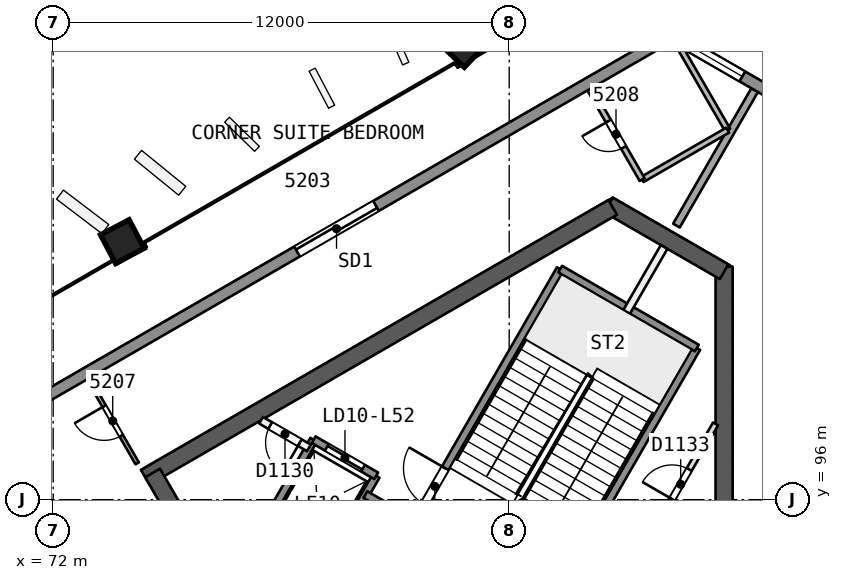
"""IFC4 building model, lengths in metres.
Left out: names, types, materials, properties, quantities, classifications, styles, units other than length and angle.
Written with IfcOpenShell. Run it as: python <this file> out.ifc"""

import sys

from ifc_helpers import new_model, si_unit, direction, frame, frame_2d, origin, origin_2d, place, context, subcontext, project, spatial, rectangle, extrude, element, fill, save


model = new_model("IFC4")
c1 = context("Model", 3, precision=1e-05, world=origin(), true_north=direction((0.0, 1.0)))
c2 = subcontext(c1, "Body", "Model", "MODEL_VIEW")
j1 = project(units=[si_unit("LENGTHUNIT", "METRE"), si_unit("PLANEANGLEUNIT", "RADIAN")], contexts=[c1])
p1 = place(None, origin())
s1 = spatial("IfcSite", under=j1, at=p1, CompositionType="ELEMENT")
p2 = place(p1, origin())
s2 = spatial("IfcBuilding", under=s1, at=p2, CompositionType="ELEMENT")
p3 = place(p2, frame((0.0, 0.0, 213.2)))
s3 = spatial("IfcBuildingStorey", under=s2, at=p3, CompositionType="ELEMENT", Elevation=213.2)
p4 = place(p3, frame((89.655, 88.019, 0.0), z_axis=(0.0, 0.0, 1.0), x_axis=(0.0, 1.0, 0.0)))
e1 = element("IfcWall", 1, at=p4, inside=s3, PredefinedType="SHEAR", context=c2, shape_type="SweptSolid", body=[
    extrude(rectangle(XDim=14.108, YDim=0.45, at=frame_2d((7.054, 0.0))), origin(), (0.0, 0.0, 1.0), 3.7),
])
p5 = place(p3, frame((89.655, 101.998, 0.0), z_axis=(0.0, 0.0, 1.0), x_axis=(-0.866042179588, 0.49997094233, 0.0)))
e2 = element("IfcWall", 2, at=p5, inside=s3, PredefinedType="SHEAR", context=c2, shape_type="SweptSolid", body=[
    extrude(rectangle(XDim=3.515, YDim=0.45, at=frame_2d((1.758, 0.0))), origin(), (0.0, 0.0, 1.0), 3.7),
])
p6 = place(p3, frame((86.723, 103.69, 0.0), z_axis=(0.0, 0.0, 1.0), x_axis=(-0.866022713978, -0.500004658852, 0.0)))
e3 = element("IfcWall", 3, at=p6, inside=s3, PredefinedType="SHEAR", context=c2, shape_type="SweptSolid", body=[
    extrude(rectangle(XDim=14.203, YDim=0.45, at=frame_2d((7.102, 0.0))), origin(), (0.0, 0.0, 1.0), 3.7),
])
p7 = place(p3, frame((74.617, 96.701, 0.0), z_axis=(0.0, 0.0, 1.0), x_axis=(0.499994385119, -0.866028645513, 0.0)))
e4 = element("IfcWall", 4, at=p7, inside=s3, PredefinedType="SHEAR", context=c2, shape_type="SweptSolid", body=[
    extrude(rectangle(XDim=10.155, YDim=0.45, at=frame_2d((5.077, 0.0))), origin(), (0.0, 0.0, 1.0), 3.7),
])
p8 = place(p7, frame((8.005, 0.0, 0.0)))
e5 = element("IfcOpeningElement", 5, at=p8, cuts=e4, PredefinedType="OPENING", context=c2, shape_type="SweptSolid", body=[
    extrude(rectangle(XDim=1.2, YDim=2.1, at=frame_2d((0.6, 1.05))), frame((0.0, 0.235, 0.0), z_axis=(0.0, -1.0, 0.0), x_axis=(1.0, 0.0, 0.0)), (0.0, 0.0, 1.0), 0.471),
])
p9 = place(p3, frame((91.809, 109.114, 0.0), z_axis=(-0.017607001884, -0.030531992032, 0.999378702468), x_axis=(0.866280455458, -0.499557977108, 1.01498e-07)))
e6 = element("IfcColumn", 6, at=p9, inside=s3, PredefinedType="COLUMN", context=c2, shape_type="SweptSolid", body=[
    extrude(rectangle(XDim=1.9, YDim=1.9, at=origin_2d()), origin(), (0.0, 0.0, 1.0), 3.702),
])
p10 = place(p3, frame((82.814, 108.011, 0.0), z_axis=(-0.00837646992, -0.028097450282, 0.999570091609), x_axis=(0.866168540849, 0.499298149106, 0.021293593943)))
e7 = element("IfcColumn", 7, at=p10, inside=s3, PredefinedType="COLUMN", context=c2, shape_type="SweptSolid", body=[
    extrude(rectangle(XDim=0.85, YDim=0.85, at=origin_2d()), origin(), (0.0, 0.0, 1.0), 3.702),
])
p11 = place(p3, frame((73.819, 102.818, 0.0), z_axis=(0.000857580205, -0.022758859284, 0.9997406158), x_axis=(0.86599968756, 0.499931370183, 0.010637962836)))
e8 = element("IfcColumn", 8, at=p11, inside=s3, PredefinedType="COLUMN", context=c2, shape_type="SweptSolid", body=[
    extrude(rectangle(XDim=0.85, YDim=0.85, at=origin_2d()), origin(), (0.0, 0.0, 1.0), 3.701),
])
p12 = place(p3, frame((90.459, 106.776, 0.0), z_axis=(0.0, 0.0, 1.0), x_axis=(-0.499979154163, -0.8660374388, 0.0)))
e9 = element("IfcWall", 9, at=p12, inside=s3, PredefinedType="PARTITIONING", context=c2, shape_type="SweptSolid", body=[
    extrude(rectangle(XDim=4.116, YDim=0.2, at=frame_2d((2.058, 0.0))), origin(), (0.0, 0.0, 1.0), 3.3),
])
p13 = place(p3, frame((74.21, 96.956, 0.0), z_axis=(0.0, 0.0, 1.0), x_axis=(-0.49995513091, 0.866051307416, 0.0)))
e10 = element("IfcWall", 10, at=p13, inside=s3, PredefinedType="PARTITIONING", context=c2, shape_type="SweptSolid", body=[
    extrude(rectangle(XDim=2.573, YDim=0.1, at=frame_2d((1.287, 0.0))), origin(), (0.0, 0.0, 1.0), 3.3),
])
p14 = place(p13, frame((0.837, 0.0, 0.0)))
e11 = element("IfcOpeningElement", 11, at=p14, cuts=e10, PredefinedType="OPENING", context=c2, shape_type="SweptSolid", body=[
    extrude(rectangle(XDim=0.9, YDim=2.1, at=frame_2d((0.45, 1.05))), frame((0.0, 0.061, 0.0), z_axis=(0.0, -1.0, 0.0), x_axis=(1.0, 0.0, 0.0)), (0.0, 0.0, 1.0), 0.121),
])
p15 = place(p3, frame((67.794, 96.223, 0.0), z_axis=(0.0, 0.0, 1.0), x_axis=(0.500010840071, -0.866019145176, 0.0)))
e12 = element("IfcWall", 12, at=p15, inside=s3, PredefinedType="PARTITIONING", context=c2, shape_type="SweptSolid", body=[
    extrude(rectangle(XDim=10.552, YDim=0.2, at=frame_2d((5.276, 0.0))), origin(), (0.0, 0.0, 1.0), 3.3),
])
p16 = place(p3, frame((88.483, 107.917, 0.0), z_axis=(0.0, 0.0, 1.0), x_axis=(0.499983796486, -0.866034758685, 0.0)))
e13 = element("IfcWall", 13, at=p16, inside=s3, PredefinedType="PARTITIONING", context=c2, shape_type="SweptSolid", body=[
    extrude(rectangle(XDim=2.534, YDim=0.15, at=frame_2d((1.267, 0.0))), origin(), (0.0, 0.0, 1.0), 3.3),
])
p17 = place(p3, frame((89.75, 105.723, 0.0), z_axis=(0.0, 0.0, 1.0), x_axis=(-0.866021400173, -0.500006934395, 0.0)))
e14 = element("IfcWall", 14, at=p17, inside=s3, PredefinedType="PARTITIONING", context=c2, shape_type="SweptSolid", body=[
    extrude(rectangle(XDim=2.6, YDim=0.15, at=frame_2d((1.3, 0.0))), origin(), (0.0, 0.0, 1.0), 3.3),
])
p18 = place(p3, frame((87.498, 104.423, 0.0), z_axis=(0.0, 0.0, 1.0), x_axis=(-0.499947816978, 0.86605552957, 0.0)))
e15 = element("IfcWall", 15, at=p18, inside=s3, PredefinedType="PARTITIONING", context=c2, shape_type="SweptSolid", body=[
    extrude(rectangle(XDim=2.751, YDim=0.15, at=frame_2d((1.375, 0.0))), origin(), (0.0, 0.0, 1.0), 3.3),
])
p19 = place(p18, frame((0.975, 0.0, 0.0)))
e16 = element("IfcOpeningElement", 16, at=p19, cuts=e15, PredefinedType="OPENING", context=c2, shape_type="SweptSolid", body=[
    extrude(rectangle(XDim=0.8, YDim=2.1, at=frame_2d((0.4, 1.05))), frame((0.0, 0.085, 0.0), z_axis=(0.0, -1.0, 0.0), x_axis=(1.0, 0.0, 0.0)), (0.0, 0.0, 1.0), 0.171),
])
p20 = place(p3, frame((88.266, 108.214, 0.0), z_axis=(0.0, 0.0, 1.0), x_axis=(0.866014017669, -0.500019720812, 0.0)))
e17 = element("IfcWall", 17, at=p20, inside=s3, PredefinedType="SOLIDWALL", context=c2, shape_type="SweptSolid", body=[
    extrude(rectangle(XDim=5.237, YDim=0.3, at=frame_2d((2.619, 0.0))), origin(), (0.0, 0.0, 1.0), 3.3),
])
p21 = place(p20, frame((3.071, 0.0, 0.9)))
e18 = element("IfcOpeningElement", 18, at=p21, cuts=e17, PredefinedType="OPENING", context=c2, shape_type="SweptSolid", body=[
    extrude(rectangle(XDim=1.8, YDim=1.5, at=frame_2d((0.9, 0.75))), frame((0.0, 0.161, 0.0), z_axis=(0.0, -1.0, 0.0), x_axis=(1.0, 0.0, 0.0)), (0.0, 0.0, 1.0), 0.321),
])
p22 = place(p20, frame((0.358, 0.0, 0.9)))
e19 = element("IfcOpeningElement", 19, at=p22, cuts=e17, PredefinedType="OPENING", context=c2, shape_type="SweptSolid", body=[
    extrude(rectangle(XDim=1.8, YDim=1.5, at=frame_2d((0.9, 0.75))), frame((0.0, 0.161, 0.0), z_axis=(0.0, -1.0, 0.0), x_axis=(1.0, 0.0, 0.0)), (0.0, 0.0, 1.0), 0.321),
])
p23 = place(p3, frame((43.933, 82.619, 0.0), z_axis=(0.0, 0.0, 1.0), x_axis=(0.866026349667, 0.49999836168, 0.0)))
e20 = element("IfcWall", 20, at=p23, inside=s3, PredefinedType="SOLIDWALL", context=c2, shape_type="SweptSolid", body=[
    extrude(rectangle(XDim=51.192, YDim=0.3, at=frame_2d((25.596, 0.0))), origin(), (0.0, 0.0, 1.0), 3.3),
])
p24 = place(p23, frame((24.552, 0.0, 0.0)))
e21 = element("IfcOpeningElement", 21, at=p24, cuts=e20, PredefinedType="OPENING", context=c2, shape_type="SweptSolid", body=[
    extrude(rectangle(XDim=2.4, YDim=2.4, at=frame_2d((1.2, 1.2))), frame((0.0, 0.161, 0.0), z_axis=(0.0, -1.0, 0.0), x_axis=(1.0, 0.0, 0.0)), (0.0, 0.0, 1.0), 0.321),
])
p25 = place(p23, frame((29.228, 0.0, 0.0)))
e22 = element("IfcOpeningElement", 22, at=p25, cuts=e20, PredefinedType="OPENING", context=c2, shape_type="SweptSolid", body=[
    extrude(rectangle(XDim=2.4, YDim=2.4, at=frame_2d((1.2, 1.2))), frame((0.0, 0.161, 0.0), z_axis=(0.0, -1.0, 0.0), x_axis=(1.0, 0.0, 0.0)), (0.0, 0.0, 1.0), 0.321),
])
p26 = place(p23, frame((39.819, 0.0, 0.0)))
e23 = element("IfcOpeningElement", 23, at=p26, cuts=e20, PredefinedType="OPENING", context=c2, shape_type="SweptSolid", body=[
    extrude(rectangle(XDim=2.4, YDim=2.4, at=frame_2d((1.2, 1.2))), frame((0.0, 0.161, 0.0), z_axis=(0.0, -1.0, 0.0), x_axis=(1.0, 0.0, 0.0)), (0.0, 0.0, 1.0), 0.321),
])
p27 = place(p23, frame((19.719, 0.0, 0.0)))
e24 = element("IfcOpeningElement", 24, at=p27, cuts=e20, PredefinedType="OPENING", context=c2, shape_type="SweptSolid", body=[
    extrude(rectangle(XDim=2.4, YDim=2.4, at=frame_2d((1.2, 1.2))), frame((0.0, 0.161, 0.0), z_axis=(0.0, -1.0, 0.0), x_axis=(1.0, 0.0, 0.0)), (0.0, 0.0, 1.0), 0.321),
])
p28 = place(p23, frame((8.993, 0.0, 0.0)))
e25 = element("IfcOpeningElement", 25, at=p28, cuts=e20, PredefinedType="OPENING", context=c2, shape_type="SweptSolid", body=[
    extrude(rectangle(XDim=2.4, YDim=2.4, at=frame_2d((1.2, 1.2))), frame((0.0, 0.161, 0.0), z_axis=(0.0, -1.0, 0.0), x_axis=(1.0, 0.0, 0.0)), (0.0, 0.0, 1.0), 0.321),
])
p29 = place(p3, frame((87.621, 94.86, 0.0), z_axis=(0.0, 0.0, 1.0), x_axis=(0.499993116331, 0.866029378036, 0.0)))
e26 = element("IfcWall", 26, at=p29, inside=s3, PredefinedType="PARTITIONING", context=c2, shape_type="SweptSolid", body=[
    extrude(rectangle(XDim=3.618, YDim=0.15, at=frame_2d((1.809, 0.0))), origin(), (0.0, 0.0, 1.0), 3.3),
])
p30 = place(p29, frame((1.332, 0.0, 0.0)))
e27 = element("IfcOpeningElement", 27, at=p30, cuts=e26, PredefinedType="OPENING", context=c2, shape_type="SweptSolid", body=[
    extrude(rectangle(XDim=0.9, YDim=2.1, at=frame_2d((0.45, 1.05))), frame((0.0, 0.085, 0.0), z_axis=(0.0, -1.0, 0.0), x_axis=(1.0, 0.0, 0.0)), (0.0, 0.0, 1.0), 0.171),
])
p31 = place(p3, frame((85.087, 93.321, 0.0), z_axis=(0.0, 0.0, 1.0), x_axis=(0.500019787375, 0.866013979237, 0.0)))
e28 = element("IfcWall", 28, at=p31, inside=s3, PredefinedType="SOLIDWALL", context=c2, shape_type="SweptSolid", body=[
    extrude(rectangle(XDim=7.7, YDim=0.2, at=frame_2d((3.85, 0.0))), origin(), (0.0, 0.0, 1.0), 3.3),
])
p32 = place(p3, frame((87.09, 100.94, 0.0), z_axis=(0.0, 0.0, 1.0), x_axis=(0.500011643316, 0.866018681408, 0.0)))
e29 = element("IfcWall", 29, at=p32, inside=s3, PredefinedType="PARTITIONING", context=c2, shape_type="SweptSolid", body=[
    extrude(rectangle(XDim=1.973, YDim=0.2, at=frame_2d((0.987, 0.0))), origin(), (0.0, 0.0, 1.0), 3.3),
])
p33 = place(p3, frame((81.493, 95.396, 0.0), z_axis=(0.0, 0.0, 1.0), x_axis=(0.500006057782, 0.866021906294, 0.0)))
e30 = element("IfcWall", 30, at=p33, inside=s3, PredefinedType="SOLIDWALL", context=c2, shape_type="SweptSolid", body=[
    extrude(rectangle(XDim=7.7, YDim=0.2, at=frame_2d((3.85, 0.0))), origin(), (0.0, 0.0, 1.0), 3.3),
])
p34 = place(p33, frame((0.55, 0.0, 0.0)))
e31 = element("IfcOpeningElement", 31, at=p34, cuts=e30, PredefinedType="OPENING", context=c2, shape_type="SweptSolid", body=[
    extrude(rectangle(XDim=1.1, YDim=2.1, at=frame_2d((0.55, 1.05))), frame((0.0, 0.11, 0.0), z_axis=(0.0, -1.0, 0.0), x_axis=(1.0, 0.0, 0.0)), (0.0, 0.0, 1.0), 0.221),
])
for number, where, z_axis, x_axis in (
    (32, (78.976, 93.986, 0.0), (0.0, 0.0, 1.0), (0.5, 0.866, 0.0)),
    (33, (77.33, 94.936, 0.0), (0.0, 0.0, 1.0), (0.5, 0.866, 0.0)),
):
    element("IfcWall", number, at=place(p3, frame(where, z_axis=z_axis, x_axis=x_axis)), inside=s3, PredefinedType="SOLIDWALL", context=c2, shape_type="SweptSolid", body=[
        extrude(rectangle(XDim=3.05, YDim=0.2, at=frame_2d((1.525, 0.0))), origin(), (0.0, 0.0, 1.0), 3.3),
    ])
p35 = place(p3, frame((89.43, 90.814, 0.0), z_axis=(0.0, 0.0, 1.0), x_axis=(-0.866018983788, 0.500011119594, 0.0)))
e34 = element("IfcWall", 34, at=p35, inside=s3, PredefinedType="SOLIDWALL", context=c2, shape_type="SweptSolid", body=[
    extrude(rectangle(XDim=10.64, YDim=0.2, at=frame_2d((5.32, 0.0))), origin(), (0.0, 0.0, 1.0), 3.3),
])
p36 = place(p35, frame((0.37, 0.0, 0.0)))
e35 = element("IfcOpeningElement", 35, at=p36, cuts=e34, PredefinedType="OPENING", context=c2, shape_type="SweptSolid", body=[
    extrude(rectangle(XDim=0.9, YDim=2.1, at=frame_2d((0.45, 1.05))), frame((0.0, 0.11, 0.0), z_axis=(0.0, -1.0, 0.0), x_axis=(1.0, 0.0, 0.0)), (0.0, 0.0, 1.0), 0.221),
])
p37 = place(p3, frame((78.73, 97.361, 0.0), z_axis=(0.0, 0.0, 1.0), x_axis=(-0.866045896294, 0.499964504253, 0.0)))
e36 = element("IfcWall", 36, at=p37, inside=s3, PredefinedType="PARTITIONING", context=c2, shape_type="SweptSolid", body=[
    extrude(rectangle(XDim=1.455, YDim=0.2, at=frame_2d((0.728, 0.0))), origin(), (0.0, 0.0, 1.0), 3.3),
])
p38 = place(p37, frame((0.278, 0.0, 0.0)))
e37 = element("IfcOpeningElement", 37, at=p38, cuts=e36, PredefinedType="OPENING", context=c2, shape_type="SweptSolid", body=[
    extrude(rectangle(XDim=0.9, YDim=2.1, at=frame_2d((0.45, 1.05))), frame((0.0, 0.11, 0.0), z_axis=(0.0, -1.0, 0.0), x_axis=(1.0, 0.0, 0.0)), (0.0, 0.0, 1.0), 0.221),
])
p39 = place(p3, frame((80.5, 96.627, 0.0), z_axis=(0.0, 0.0, 1.0), x_axis=(-0.86601224135, 0.500022797313, 0.0)))
e38 = element("IfcWall", 38, at=p39, inside=s3, PredefinedType="SOLIDWALL", context=c2, shape_type="SweptSolid", body=[
    extrude(rectangle(XDim=1.9, YDim=0.2, at=frame_2d((0.95, 0.0))), origin(), (0.0, 0.0, 1.0), 3.3),
])
p40 = place(p39, frame((0.4, 0.0, 0.0)))
e39 = element("IfcOpeningElement", 39, at=p40, cuts=e38, PredefinedType="OPENING", context=c2, shape_type="SweptSolid", body=[
    extrude(rectangle(XDim=1.1, YDim=2.1, at=frame_2d((0.55, 1.05))), frame((0.0, 0.11, 0.0), z_axis=(0.0, -1.0, 0.0), x_axis=(1.0, 0.0, 0.0)), (0.0, 0.0, 1.0), 0.221),
])
p41 = place(p3, frame((88.937, 99.99, 0.0), z_axis=(0.0, 0.0, 1.0), x_axis=(-0.866004344652, 0.500036473714, 0.0)))
e40 = element("IfcWall", 40, at=p41, inside=s3, PredefinedType="SOLIDWALL", context=c2, shape_type="SweptSolid", body=[
    extrude(rectangle(XDim=4.15, YDim=0.2, at=frame_2d((2.075, 0.0))), origin(), (0.0, 0.0, 1.0), 3.3),
])
p42 = place(p14, origin())
e41 = element("IfcDoor", 41, at=p42, inside=s3, OperationType="SINGLE_SWING_RIGHT", PredefinedType="NOTDEFINED", context=c2, shape_type="SweptSolid", body=[
    extrude(rectangle(XDim=0.9, YDim=2.1, at=frame_2d((0.45, 1.05))), frame((0.0, 0.025, 0.0), z_axis=(0.0, -1.0, 0.0), x_axis=(1.0, 0.0, 0.0)), (0.0, 0.0, 1.0), 0.05),
])
fill(e11, e41)
p43 = place(p19, origin())
e42 = element("IfcDoor", 42, at=p43, inside=s3, OperationType="SINGLE_SWING_RIGHT", PredefinedType="NOTDEFINED", context=c2, shape_type="SweptSolid", body=[
    extrude(rectangle(XDim=0.8, YDim=2.1, at=frame_2d((0.4, 1.05))), frame((0.0, 0.025, 0.0), z_axis=(0.0, -1.0, 0.0), x_axis=(1.0, 0.0, 0.0)), (0.0, 0.0, 1.0), 0.05),
])
fill(e16, e42)
p44 = place(p22, origin())
e43 = element("IfcWindow", 43, at=p44, inside=s3, PartitioningType="SINGLE_PANEL", PredefinedType="WINDOW", context=c2, shape_type="SweptSolid", body=[
    extrude(rectangle(XDim=1.8, YDim=1.5, at=frame_2d((0.9, 0.75))), frame((0.0, 0.03, 0.0), z_axis=(0.0, -1.0, 0.0), x_axis=(1.0, 0.0, 0.0)), (0.0, 0.0, 1.0), 0.06),
])
fill(e19, e43)
p45 = place(p26, origin())
e44 = element("IfcDoor", 44, at=p45, inside=s3, OperationType="SLIDING_TO_LEFT", PredefinedType="NOTDEFINED", context=c2, shape_type="SweptSolid", body=[
    extrude(rectangle(XDim=2.4, YDim=2.4, at=frame_2d((1.2, 1.2))), frame((0.0, 0.025, 0.0), z_axis=(0.0, -1.0, 0.0), x_axis=(1.0, 0.0, 0.0)), (0.0, 0.0, 1.0), 0.05),
])
fill(e23, e44)
p46 = place(p40, origin())
e45 = element("IfcDoor", 45, at=p46, inside=s3, OperationType="SLIDING_TO_RIGHT", PredefinedType="NOTDEFINED", context=c2, shape_type="SweptSolid", body=[
    extrude(rectangle(XDim=1.1, YDim=2.1, at=frame_2d((0.55, 1.05))), frame((0.0, 0.025, 0.0), z_axis=(0.0, -1.0, 0.0), x_axis=(1.0, 0.0, 0.0)), (0.0, 0.0, 1.0), 0.05),
])
fill(e39, e45)
p47 = place(p38, origin())
e46 = element("IfcDoor", 46, at=p47, inside=s3, OperationType="SINGLE_SWING_LEFT", PredefinedType="NOTDEFINED", context=c2, shape_type="SweptSolid", body=[
    extrude(rectangle(XDim=0.9, YDim=2.1, at=frame_2d((0.45, 1.05))), frame((0.0, 0.025, 0.0), z_axis=(0.0, -1.0, 0.0), x_axis=(1.0, 0.0, 0.0)), (0.0, 0.0, 1.0), 0.05),
])
fill(e37, e46)
p48 = place(p34, origin())
e47 = element("IfcDoor", 47, at=p48, inside=s3, OperationType="SINGLE_SWING_RIGHT", PredefinedType="NOTDEFINED", context=c2, shape_type="SweptSolid", body=[
    extrude(rectangle(XDim=1.1, YDim=2.1, at=frame_2d((0.55, 1.05))), frame((0.0, 0.025, 0.0), z_axis=(0.0, -1.0, 0.0), x_axis=(1.0, 0.0, 0.0)), (0.0, 0.0, 1.0), 0.05),
])
fill(e31, e47)
p49 = place(p30, origin())
e48 = element("IfcDoor", 48, at=p49, inside=s3, OperationType="SINGLE_SWING_LEFT", PredefinedType="NOTDEFINED", context=c2, shape_type="SweptSolid", body=[
    extrude(rectangle(XDim=0.9, YDim=2.1, at=frame_2d((0.45, 1.05))), frame((0.0, 0.025, 0.0), z_axis=(0.0, -1.0, 0.0), x_axis=(1.0, 0.0, 0.0)), (0.0, 0.0, 1.0), 0.05),
])
fill(e27, e48)
save(model, sys.argv[1])
